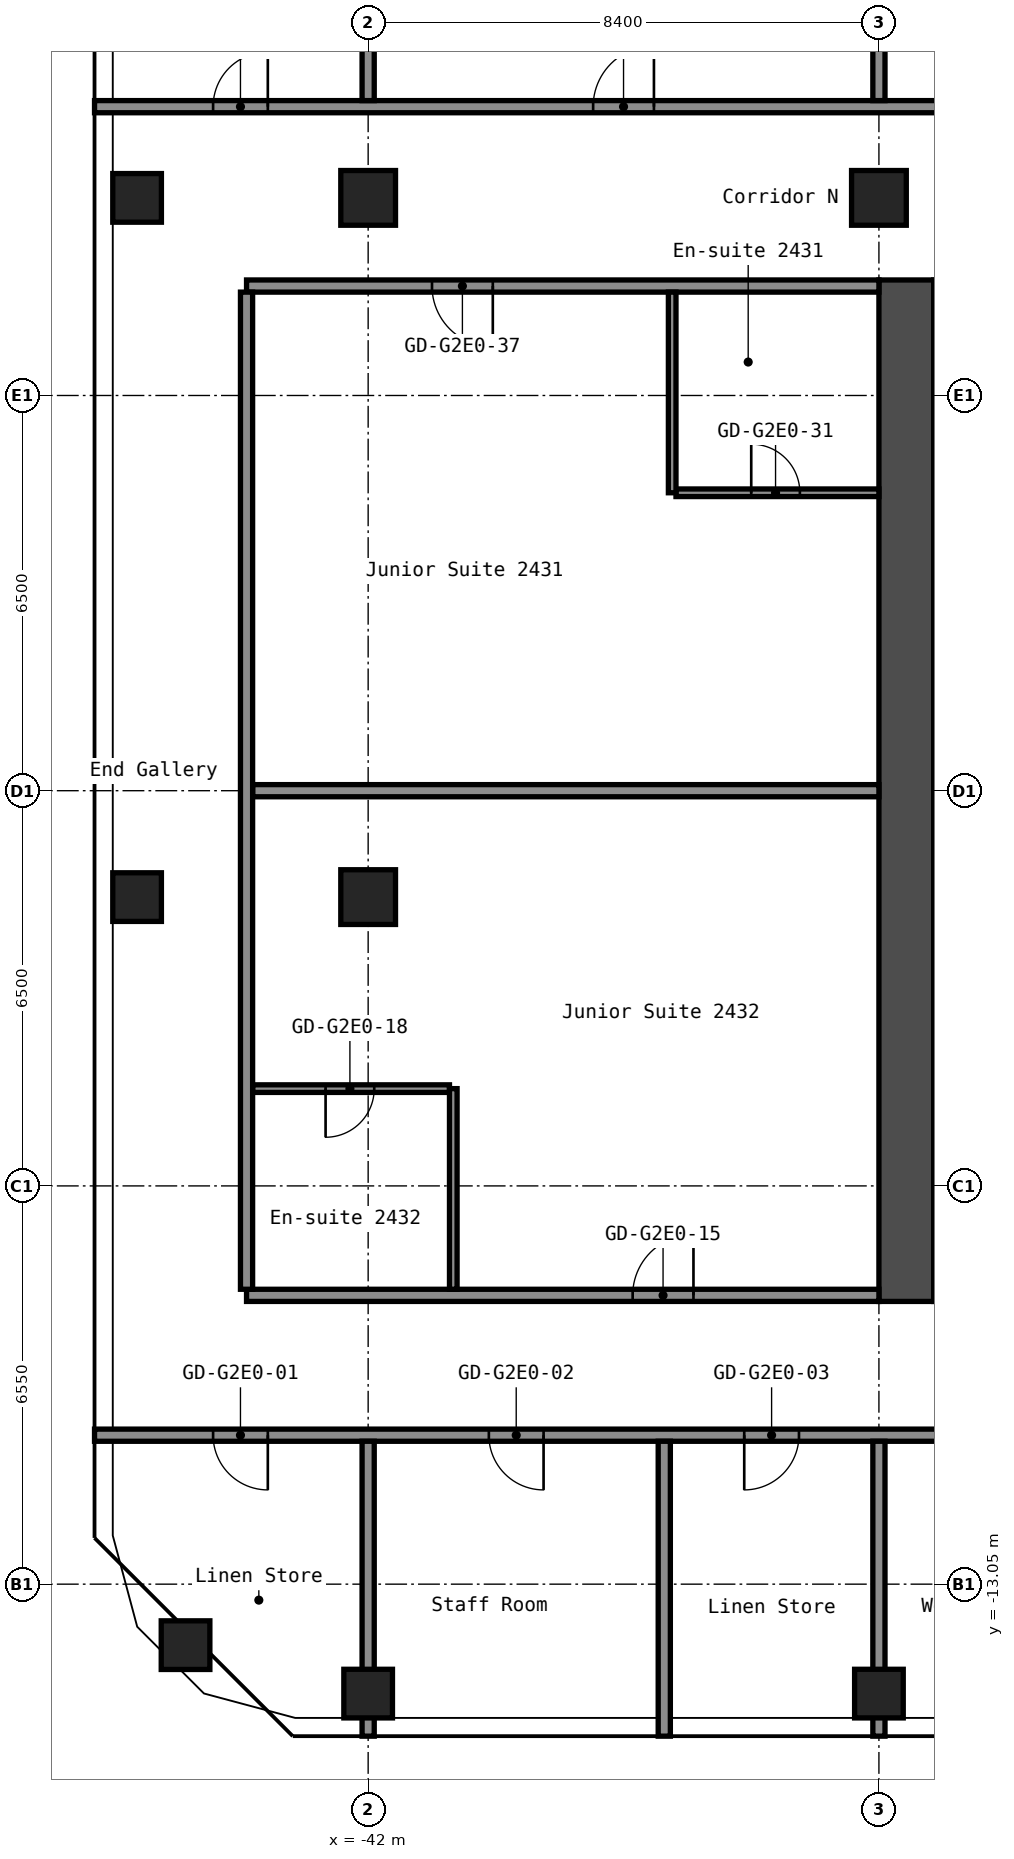
"""IFC4 building model, lengths in metres.
Left out: names, types, materials, properties, quantities, classifications, styles, units other than length and angle.
Written with IfcOpenShell. Run it as: python <this file> out.ifc"""

import sys

from ifc_helpers import new_model, si_unit, direction, frame, frame_2d, origin, origin_2d, place, context, subcontext, project, spatial, rectangle, hollow_rectangle, extrude, element, fill, save


model = new_model("IFC4")
c1 = context("Model", 3, precision=1e-05, world=origin(), true_north=direction((0.0, 1.0)))
c2 = subcontext(c1, "Body", "Model", "MODEL_VIEW")
j1 = project(units=[si_unit("LENGTHUNIT", "METRE"), si_unit("PLANEANGLEUNIT", "RADIAN")], contexts=[c1])
p1 = place(None, origin())
s1 = spatial("IfcSite", under=j1, at=p1, CompositionType="ELEMENT")
p2 = place(p1, origin())
s2 = spatial("IfcBuilding", under=s1, at=p2, CompositionType="ELEMENT")
p3 = place(p2, frame((0.0, 0.0, 88.2)))
s3 = spatial("IfcBuildingStorey", under=s2, at=p3, CompositionType="ELEMENT", Elevation=88.2)
for number, where, z_axis, x_axis in (
    (1, (-45.003, -14.053, 0.0), (0.0, 0.0, 1.0), (1.0, 0.0, 0.0)),
    (2, (-45.8, -1.75, 0.0), (0.0, 0.0, 1.0), (1.0, 0.0, 0.0)),
    (3, (-45.8, 9.75, 0.0), (0.0, 0.0, 1.0), (1.0, 0.0, 0.0)),
    (4, (-42.0, -14.85, 0.0), (0.0, 0.0, 1.0), (1.0, 0.0, 0.0)),
):
    element("IfcColumn", number, at=place(p3, frame(where, z_axis=z_axis, x_axis=x_axis)), inside=s3, PredefinedType="COLUMN", context=c2, shape_type="SweptSolid", body=[
        extrude(hollow_rectangle(XDim=0.8, YDim=0.8, WallThickness=0.032, at=origin_2d()), origin(), (0.0, 0.0, 1.0), 2.8),
    ])
for number, where, z_axis, x_axis in (
    (5, (-42.0, -1.75, 0.0), (0.0, 0.0, 1.0), (1.0, 0.0, 0.0)),
    (6, (-42.0, 9.75, 0.0), (0.0, 0.0, 1.0), (1.0, 0.0, 0.0)),
):
    element("IfcColumn", number, at=place(p3, frame(where, z_axis=z_axis, x_axis=x_axis)), inside=s3, PredefinedType="COLUMN", context=c2, shape_type="SweptSolid", body=[
        extrude(hollow_rectangle(XDim=0.9, YDim=0.9, WallThickness=0.036, at=origin_2d()), origin(), (0.0, 0.0, 1.0), 2.8),
    ])
p4 = place(p3, frame((-33.6, -14.85, 0.0), z_axis=(0.0, 0.0, 1.0), x_axis=(1.0, 0.0, 0.0)))
e7 = element("IfcColumn", 7, at=p4, inside=s3, PredefinedType="COLUMN", context=c2, shape_type="SweptSolid", body=[
    extrude(hollow_rectangle(XDim=0.8, YDim=0.8, WallThickness=0.032, at=origin_2d()), origin(), (0.0, 0.0, 1.0), 2.8),
])
p5 = place(p3, frame((-33.6, 9.75, 0.0), z_axis=(0.0, 0.0, 1.0), x_axis=(1.0, 0.0, 0.0)))
e8 = element("IfcColumn", 8, at=p5, inside=s3, PredefinedType="COLUMN", context=c2, shape_type="SweptSolid", body=[
    extrude(hollow_rectangle(XDim=0.9, YDim=0.9, WallThickness=0.036, at=origin_2d()), origin(), (0.0, 0.0, 1.0), 2.8),
])
p6 = place(p3, frame((-33.15, -8.4, 0.0), z_axis=(0.0, 0.0, 1.0), x_axis=(0.0, 1.0, 0.0)))
e9 = element("IfcWall", 9, at=p6, inside=s3, PredefinedType="SHEAR", context=c2, shape_type="SweptSolid", body=[
    extrude(rectangle(XDim=16.8, YDim=0.9, at=frame_2d((8.4, 0.0))), origin(), (0.0, 0.0, 1.0), 2.8),
])
p7 = place(p3, frame((-32.7, 1.325, 0.0), z_axis=(0.0, 0.0, 1.0), x_axis=(1.0, 0.0, 0.0)))
e10 = element("IfcWall", 10, at=p7, inside=s3, PredefinedType="SHEAR", context=c2, shape_type="SweptSolid", body=[
    extrude(rectangle(XDim=5.05, YDim=0.25, at=frame_2d((2.525, 0.0))), origin(), (0.0, 0.0, 1.0), 2.8),
])
p8 = place(p7, frame((3.3, 0.0, 0.0)))
e11 = element("IfcOpeningElement", 11, at=p8, cuts=e10, PredefinedType="OPENING", context=c2, shape_type="SweptSolid", body=[
    extrude(rectangle(XDim=1.2, YDim=2.1, at=frame_2d((0.6, 1.05))), frame((0.0, 0.135, 0.0), z_axis=(0.0, -1.0, 0.0), x_axis=(1.0, 0.0, 0.0)), (0.0, 0.0, 1.0), 0.27),
])
p9 = place(p3, frame((-32.7, -3.625, 0.0), z_axis=(0.0, 0.0, 1.0), x_axis=(1.0, 0.0, 0.0)))
e12 = element("IfcWall", 12, at=p9, inside=s3, PredefinedType="SHEAR", context=c2, shape_type="SweptSolid", body=[
    extrude(rectangle(XDim=4.55, YDim=0.25, at=frame_2d((2.275, 0.0))), origin(), (0.0, 0.0, 1.0), 2.8),
])
p10 = place(p9, frame((2.85, 0.0, 0.0)))
e13 = element("IfcOpeningElement", 13, at=p10, cuts=e12, PredefinedType="OPENING", context=c2, shape_type="SweptSolid", body=[
    extrude(rectangle(XDim=1.1, YDim=2.1, at=frame_2d((0.55, 1.05))), frame((0.0, 0.135, 0.0), z_axis=(0.0, -1.0, 0.0), x_axis=(1.0, 0.0, 0.0)), (0.0, 0.0, 1.0), 0.27),
])
p11 = place(p9, frame((0.6, 0.0, 0.0)))
e14 = element("IfcOpeningElement", 14, at=p11, cuts=e12, PredefinedType="OPENING", context=c2, shape_type="SweptSolid", body=[
    extrude(rectangle(XDim=1.1, YDim=2.1, at=frame_2d((0.55, 1.05))), frame((0.0, 0.135, 0.0), z_axis=(0.0, -1.0, 0.0), x_axis=(1.0, 0.0, 0.0)), (0.0, 0.0, 1.0), 0.27),
])
p12 = place(p3, frame((-32.7, -6.75, 0.0), z_axis=(0.0, 0.0, 1.0), x_axis=(1.0, 0.0, 0.0)))
e15 = element("IfcWall", 15, at=p12, inside=s3, PredefinedType="SHEAR", context=c2, shape_type="SweptSolid", body=[
    extrude(rectangle(XDim=4.55, YDim=1.5, at=frame_2d((2.275, 0.0))), origin(), (0.0, 0.0, 1.0), 2.8),
])
p13 = place(p3, frame((-32.7, -1.075, 0.0), z_axis=(0.0, 0.0, 1.0), x_axis=(1.0, 0.0, 0.0)))
e16 = element("IfcWall", 16, at=p13, inside=s3, PredefinedType="PARTITIONING", context=c2, shape_type="SweptSolid", body=[
    extrude(rectangle(XDim=1.6, YDim=0.15, at=frame_2d((0.8, 0.0))), origin(), (0.0, 0.0, 1.0), 2.8),
])
p14 = place(p3, frame((-46.5, -10.6, 0.0), z_axis=(0.0, 0.0, 1.0), x_axis=(1.0, 0.0, 0.0)))
e17 = element("IfcWall", 17, at=p14, inside=s3, PredefinedType="PARTITIONING", context=c2, shape_type="SweptSolid", body=[
    extrude(rectangle(XDim=29.7, YDim=0.2, at=frame_2d((14.85, 0.0))), origin(), (0.0, 0.0, 1.0), 2.8),
])
p15 = place(p14, frame((1.95, 0.0, 0.0)))
e18 = element("IfcOpeningElement", 18, at=p15, cuts=e17, PredefinedType="OPENING", context=c2, shape_type="SweptSolid", body=[
    extrude(rectangle(XDim=0.9, YDim=2.1, at=frame_2d((0.45, 1.05))), frame((0.0, 0.11, 0.0), z_axis=(0.0, -1.0, 0.0), x_axis=(1.0, 0.0, 0.0)), (0.0, 0.0, 1.0), 0.22),
])
p16 = place(p14, frame((6.485, 0.0, 0.0)))
e19 = element("IfcOpeningElement", 19, at=p16, cuts=e17, PredefinedType="OPENING", context=c2, shape_type="SweptSolid", body=[
    extrude(rectangle(XDim=0.9, YDim=2.1, at=frame_2d((0.45, 1.05))), frame((0.0, 0.11, 0.0), z_axis=(0.0, -1.0, 0.0), x_axis=(1.0, 0.0, 0.0)), (0.0, 0.0, 1.0), 0.22),
])
p17 = place(p14, frame((10.685, 0.0, 0.0)))
e20 = element("IfcOpeningElement", 20, at=p17, cuts=e17, PredefinedType="OPENING", context=c2, shape_type="SweptSolid", body=[
    extrude(rectangle(XDim=0.9, YDim=2.1, at=frame_2d((0.45, 1.05))), frame((0.0, 0.11, 0.0), z_axis=(0.0, -1.0, 0.0), x_axis=(1.0, 0.0, 0.0)), (0.0, 0.0, 1.0), 0.22),
])
p18 = place(p14, frame((14.8, 0.0, 0.0)))
e21 = element("IfcOpeningElement", 21, at=p18, cuts=e17, PredefinedType="OPENING", context=c2, shape_type="SweptSolid", body=[
    extrude(rectangle(XDim=0.9, YDim=2.1, at=frame_2d((0.45, 1.05))), frame((0.0, 0.11, 0.0), z_axis=(0.0, -1.0, 0.0), x_axis=(1.0, 0.0, 0.0)), (0.0, 0.0, 1.0), 0.22),
])
p19 = place(p14, frame((19.0, 0.0, 0.0)))
e22 = element("IfcOpeningElement", 22, at=p19, cuts=e17, PredefinedType="OPENING", context=c2, shape_type="SweptSolid", body=[
    extrude(rectangle(XDim=0.9, YDim=2.1, at=frame_2d((0.45, 1.05))), frame((0.0, 0.11, 0.0), z_axis=(0.0, -1.0, 0.0), x_axis=(1.0, 0.0, 0.0)), (0.0, 0.0, 1.0), 0.22),
])
p20 = place(p14, frame((23.455, 0.0, 0.0)))
e23 = element("IfcOpeningElement", 23, at=p20, cuts=e17, PredefinedType="OPENING", context=c2, shape_type="SweptSolid", body=[
    extrude(rectangle(XDim=0.9, YDim=2.1, at=frame_2d((0.45, 1.05))), frame((0.0, 0.11, 0.0), z_axis=(0.0, -1.0, 0.0), x_axis=(1.0, 0.0, 0.0)), (0.0, 0.0, 1.0), 0.22),
])
p21 = place(p14, frame((27.655, 0.0, 0.0)))
e24 = element("IfcOpeningElement", 24, at=p21, cuts=e17, PredefinedType="OPENING", context=c2, shape_type="SweptSolid", body=[
    extrude(rectangle(XDim=0.9, YDim=2.1, at=frame_2d((0.45, 1.05))), frame((0.0, 0.11, 0.0), z_axis=(0.0, -1.0, 0.0), x_axis=(1.0, 0.0, 0.0)), (0.0, 0.0, 1.0), 0.22),
])
p22 = place(p3, frame((-44.0, -8.3, 0.0), z_axis=(0.0, 0.0, 1.0), x_axis=(1.0, 0.0, 0.0)))
e25 = element("IfcWall", 25, at=p22, inside=s3, PredefinedType="PARTITIONING", context=c2, shape_type="SweptSolid", body=[
    extrude(rectangle(XDim=10.4, YDim=0.2, at=frame_2d((5.2, 0.0))), origin(), (0.0, 0.0, 1.0), 2.8),
])
p23 = place(p22, frame((6.35, 0.0, 0.0)))
e26 = element("IfcOpeningElement", 26, at=p23, cuts=e25, PredefinedType="OPENING", context=c2, shape_type="SweptSolid", body=[
    extrude(rectangle(XDim=1.0, YDim=2.1, at=frame_2d((0.5, 1.05))), frame((0.0, 0.11, 0.0), z_axis=(0.0, -1.0, 0.0), x_axis=(1.0, 0.0, 0.0)), (0.0, 0.0, 1.0), 0.22),
])
p24 = place(p3, frame((-43.9, -4.9, 0.0), z_axis=(0.0, 0.0, 1.0), x_axis=(1.0, 0.0, 0.0)))
e27 = element("IfcWall", 27, at=p24, inside=s3, PredefinedType="PARTITIONING", context=c2, shape_type="SweptSolid", body=[
    extrude(rectangle(XDim=3.237, YDim=0.125, at=frame_2d((1.619, 0.0))), origin(), (0.0, 0.0, 1.0), 2.8),
])
p25 = place(p24, frame((1.2, 0.0, 0.0)))
e28 = element("IfcOpeningElement", 28, at=p25, cuts=e27, PredefinedType="OPENING", context=c2, shape_type="SweptSolid", body=[
    extrude(rectangle(XDim=0.8, YDim=2.1, at=frame_2d((0.4, 1.05))), frame((0.0, 0.073, 0.0), z_axis=(0.0, -1.0, 0.0), x_axis=(1.0, 0.0, 0.0)), (0.0, 0.0, 1.0), 0.145),
])
p26 = place(p3, frame((-43.9, 0.0, 0.0), z_axis=(0.0, 0.0, 1.0), x_axis=(1.0, 0.0, 0.0)))
e29 = element("IfcWall", 29, at=p26, inside=s3, PredefinedType="PARTITIONING", context=c2, shape_type="SweptSolid", body=[
    extrude(rectangle(XDim=10.3, YDim=0.2, at=frame_2d((5.15, 0.0))), origin(), (0.0, 0.0, 1.0), 2.8),
])
p27 = place(p3, frame((-36.938, 4.9, 0.0), z_axis=(0.0, 0.0, 1.0), x_axis=(1.0, 0.0, 0.0)))
e30 = element("IfcWall", 30, at=p27, inside=s3, PredefinedType="PARTITIONING", context=c2, shape_type="SweptSolid", body=[
    extrude(rectangle(XDim=3.337, YDim=0.125, at=frame_2d((1.669, 0.0))), origin(), (0.0, 0.0, 1.0), 2.8),
])
p28 = place(p27, frame((1.238, 0.0, 0.0)))
e31 = element("IfcOpeningElement", 31, at=p28, cuts=e30, PredefinedType="OPENING", context=c2, shape_type="SweptSolid", body=[
    extrude(rectangle(XDim=0.8, YDim=2.1, at=frame_2d((0.4, 1.05))), frame((0.0, 0.073, 0.0), z_axis=(0.0, -1.0, 0.0), x_axis=(1.0, 0.0, 0.0)), (0.0, 0.0, 1.0), 0.145),
])
p29 = place(p3, frame((-44.0, 8.3, 0.0), z_axis=(0.0, 0.0, 1.0), x_axis=(1.0, 0.0, 0.0)))
e32 = element("IfcWall", 32, at=p29, inside=s3, PredefinedType="PARTITIONING", context=c2, shape_type="SweptSolid", body=[
    extrude(rectangle(XDim=10.4, YDim=0.2, at=frame_2d((5.2, 0.0))), origin(), (0.0, 0.0, 1.0), 2.8),
])
p30 = place(p29, frame((3.05, 0.0, 0.0)))
e33 = element("IfcOpeningElement", 33, at=p30, cuts=e32, PredefinedType="OPENING", context=c2, shape_type="SweptSolid", body=[
    extrude(rectangle(XDim=1.0, YDim=2.1, at=frame_2d((0.5, 1.05))), frame((0.0, 0.11, 0.0), z_axis=(0.0, -1.0, 0.0), x_axis=(1.0, 0.0, 0.0)), (0.0, 0.0, 1.0), 0.22),
])
p31 = place(p3, frame((-46.5, 11.25, 0.0), z_axis=(0.0, 0.0, 1.0), x_axis=(1.0, 0.0, 0.0)))
e34 = element("IfcWall", 34, at=p31, inside=s3, PredefinedType="PARTITIONING", context=c2, shape_type="SweptSolid", body=[
    extrude(rectangle(XDim=29.7, YDim=0.2, at=frame_2d((14.85, 0.0))), origin(), (0.0, 0.0, 1.0), 2.8),
])
p32 = place(p31, frame((1.95, 0.0, 0.0)))
e35 = element("IfcOpeningElement", 35, at=p32, cuts=e34, PredefinedType="OPENING", context=c2, shape_type="SweptSolid", body=[
    extrude(rectangle(XDim=0.9, YDim=2.1, at=frame_2d((0.45, 1.05))), frame((0.0, 0.11, 0.0), z_axis=(0.0, -1.0, 0.0), x_axis=(1.0, 0.0, 0.0)), (0.0, 0.0, 1.0), 0.22),
])
p33 = place(p31, frame((8.2, 0.0, 0.0)))
e36 = element("IfcOpeningElement", 36, at=p33, cuts=e34, PredefinedType="OPENING", context=c2, shape_type="SweptSolid", body=[
    extrude(rectangle(XDim=1.0, YDim=2.1, at=frame_2d((0.5, 1.05))), frame((0.0, 0.11, 0.0), z_axis=(0.0, -1.0, 0.0), x_axis=(1.0, 0.0, 0.0)), (0.0, 0.0, 1.0), 0.22),
])
p34 = place(p31, frame((16.6, 0.0, 0.0)))
e37 = element("IfcOpeningElement", 37, at=p34, cuts=e34, PredefinedType="OPENING", context=c2, shape_type="SweptSolid", body=[
    extrude(rectangle(XDim=1.0, YDim=2.1, at=frame_2d((0.5, 1.05))), frame((0.0, 0.11, 0.0), z_axis=(0.0, -1.0, 0.0), x_axis=(1.0, 0.0, 0.0)), (0.0, 0.0, 1.0), 0.22),
])
p35 = place(p31, frame((25.0, 0.0, 0.0)))
e38 = element("IfcOpeningElement", 38, at=p35, cuts=e34, PredefinedType="OPENING", context=c2, shape_type="SweptSolid", body=[
    extrude(rectangle(XDim=1.0, YDim=2.1, at=frame_2d((0.5, 1.05))), frame((0.0, 0.11, 0.0), z_axis=(0.0, -1.0, 0.0), x_axis=(1.0, 0.0, 0.0)), (0.0, 0.0, 1.0), 0.22),
])
p36 = place(p3, frame((-44.0, -8.2, 0.0), z_axis=(0.0, 0.0, 1.0), x_axis=(0.0, 1.0, 0.0)))
e39 = element("IfcWall", 39, at=p36, inside=s3, PredefinedType="PARTITIONING", context=c2, shape_type="SweptSolid", body=[
    extrude(rectangle(XDim=16.4, YDim=0.2, at=frame_2d((8.2, 0.0))), origin(), (0.0, 0.0, 1.0), 2.8),
])
p37 = place(p3, frame((-42.0, -15.55, 0.0), z_axis=(0.0, 0.0, 1.0), x_axis=(0.0, 1.0, 0.0)))
e40 = element("IfcWall", 40, at=p37, inside=s3, PredefinedType="PARTITIONING", context=c2, shape_type="SweptSolid", body=[
    extrude(rectangle(XDim=4.85, YDim=0.2, at=frame_2d((2.425, 0.0))), origin(), (0.0, 0.0, 1.0), 2.8),
])
p38 = place(p3, frame((-42.0, 11.35, 0.0), z_axis=(0.0, 0.0, 1.0), x_axis=(0.0, 1.0, 0.0)))
e41 = element("IfcWall", 41, at=p38, inside=s3, PredefinedType="PARTITIONING", context=c2, shape_type="SweptSolid", body=[
    extrude(rectangle(XDim=12.2, YDim=0.2, at=frame_2d((6.1, 0.0))), origin(), (0.0, 0.0, 1.0), 2.8),
])
p39 = place(p3, frame((-40.6, -8.2, 0.0), z_axis=(0.0, 0.0, 1.0), x_axis=(0.0, 1.0, 0.0)))
e42 = element("IfcWall", 42, at=p39, inside=s3, PredefinedType="PARTITIONING", context=c2, shape_type="SweptSolid", body=[
    extrude(rectangle(XDim=3.3, YDim=0.125, at=frame_2d((1.65, 0.0))), origin(), (0.0, 0.0, 1.0), 2.8),
])
p40 = place(p3, frame((-37.13, -15.55, 0.0), z_axis=(0.0, 0.0, 1.0), x_axis=(0.0, 1.0, 0.0)))
e43 = element("IfcWall", 43, at=p40, inside=s3, PredefinedType="PARTITIONING", context=c2, shape_type="SweptSolid", body=[
    extrude(rectangle(XDim=4.85, YDim=0.2, at=frame_2d((2.425, 0.0))), origin(), (0.0, 0.0, 1.0), 2.8),
])
p41 = place(p3, frame((-37.0, 4.9, 0.0), z_axis=(0.0, 0.0, 1.0), x_axis=(0.0, 1.0, 0.0)))
e44 = element("IfcWall", 44, at=p41, inside=s3, PredefinedType="PARTITIONING", context=c2, shape_type="SweptSolid", body=[
    extrude(rectangle(XDim=3.3, YDim=0.125, at=frame_2d((1.65, 0.0))), origin(), (0.0, 0.0, 1.0), 2.8),
])
p42 = place(p3, frame((-33.6, -15.55, 0.0), z_axis=(0.0, 0.0, 1.0), x_axis=(0.0, 1.0, 0.0)))
e45 = element("IfcWall", 45, at=p42, inside=s3, PredefinedType="PARTITIONING", context=c2, shape_type="SweptSolid", body=[
    extrude(rectangle(XDim=4.85, YDim=0.2, at=frame_2d((2.425, 0.0))), origin(), (0.0, 0.0, 1.0), 2.8),
])
p43 = place(p3, frame((-33.6, 11.35, 0.0), z_axis=(0.0, 0.0, 1.0), x_axis=(0.0, 1.0, 0.0)))
e46 = element("IfcWall", 46, at=p43, inside=s3, PredefinedType="PARTITIONING", context=c2, shape_type="SweptSolid", body=[
    extrude(rectangle(XDim=12.2, YDim=0.2, at=frame_2d((6.1, 0.0))), origin(), (0.0, 0.0, 1.0), 2.8),
])
p44 = place(p15, origin())
e47 = element("IfcDoor", 47, at=p44, inside=s3, OperationType="SINGLE_SWING_RIGHT", PredefinedType="DOOR", context=c2, shape_type="SweptSolid", body=[
    extrude(rectangle(XDim=0.9, YDim=2.1, at=frame_2d((0.45, 1.05))), frame((0.0, 0.025, 0.0), z_axis=(0.0, -1.0, 0.0), x_axis=(1.0, 0.0, 0.0)), (0.0, 0.0, 1.0), 0.05),
])
fill(e18, e47)
p45 = place(p16, origin())
e48 = element("IfcDoor", 48, at=p45, inside=s3, OperationType="SINGLE_SWING_RIGHT", PredefinedType="DOOR", context=c2, shape_type="SweptSolid", body=[
    extrude(rectangle(XDim=0.9, YDim=2.1, at=frame_2d((0.45, 1.05))), frame((0.0, 0.025, 0.0), z_axis=(0.0, -1.0, 0.0), x_axis=(1.0, 0.0, 0.0)), (0.0, 0.0, 1.0), 0.05),
])
fill(e19, e48)
p46 = place(p17, origin())
e49 = element("IfcDoor", 49, at=p46, inside=s3, OperationType="SINGLE_SWING_LEFT", PredefinedType="DOOR", context=c2, shape_type="SweptSolid", body=[
    extrude(rectangle(XDim=0.9, YDim=2.1, at=frame_2d((0.45, 1.05))), frame((0.0, 0.025, 0.0), z_axis=(0.0, -1.0, 0.0), x_axis=(1.0, 0.0, 0.0)), (0.0, 0.0, 1.0), 0.05),
])
fill(e20, e49)
p47 = place(p23, origin())
e50 = element("IfcDoor", 50, at=p47, inside=s3, OperationType="SINGLE_SWING_LEFT", PredefinedType="DOOR", context=c2, shape_type="SweptSolid", body=[
    extrude(rectangle(XDim=1.0, YDim=2.1, at=frame_2d((0.5, 1.05))), frame((0.0, 0.025, 0.0), z_axis=(0.0, -1.0, 0.0), x_axis=(1.0, 0.0, 0.0)), (0.0, 0.0, 1.0), 0.05),
])
fill(e26, e50)
p48 = place(p25, origin())
e51 = element("IfcDoor", 51, at=p48, inside=s3, OperationType="SINGLE_SWING_LEFT", PredefinedType="DOOR", context=c2, shape_type="SweptSolid", body=[
    extrude(rectangle(XDim=0.8, YDim=2.1, at=frame_2d((0.4, 1.05))), frame((0.0, 0.025, 0.0), z_axis=(0.0, -1.0, 0.0), x_axis=(1.0, 0.0, 0.0)), (0.0, 0.0, 1.0), 0.05),
])
fill(e28, e51)
p49 = place(p28, origin())
e52 = element("IfcDoor", 52, at=p49, inside=s3, OperationType="SINGLE_SWING_RIGHT", PredefinedType="DOOR", context=c2, shape_type="SweptSolid", body=[
    extrude(rectangle(XDim=0.8, YDim=2.1, at=frame_2d((0.4, 1.05))), frame((0.0, 0.025, 0.0), z_axis=(0.0, -1.0, 0.0), x_axis=(1.0, 0.0, 0.0)), (0.0, 0.0, 1.0), 0.05),
])
fill(e31, e52)
p50 = place(p30, origin())
e53 = element("IfcDoor", 53, at=p50, inside=s3, OperationType="SINGLE_SWING_RIGHT", PredefinedType="DOOR", context=c2, shape_type="SweptSolid", body=[
    extrude(rectangle(XDim=1.0, YDim=2.1, at=frame_2d((0.5, 1.05))), frame((0.0, 0.025, 0.0), z_axis=(0.0, -1.0, 0.0), x_axis=(1.0, 0.0, 0.0)), (0.0, 0.0, 1.0), 0.05),
])
fill(e33, e53)
p51 = place(p32, origin())
e54 = element("IfcDoor", 54, at=p51, inside=s3, OperationType="SINGLE_SWING_LEFT", PredefinedType="DOOR", context=c2, shape_type="SweptSolid", body=[
    extrude(rectangle(XDim=0.9, YDim=2.1, at=frame_2d((0.45, 1.05))), frame((0.0, 0.025, 0.0), z_axis=(0.0, -1.0, 0.0), x_axis=(1.0, 0.0, 0.0)), (0.0, 0.0, 1.0), 0.05),
])
fill(e35, e54)
p52 = place(p33, origin())
e55 = element("IfcDoor", 55, at=p52, inside=s3, OperationType="SINGLE_SWING_LEFT", PredefinedType="DOOR", context=c2, shape_type="SweptSolid", body=[
    extrude(rectangle(XDim=1.0, YDim=2.1, at=frame_2d((0.5, 1.05))), frame((0.0, 0.025, 0.0), z_axis=(0.0, -1.0, 0.0), x_axis=(1.0, 0.0, 0.0)), (0.0, 0.0, 1.0), 0.05),
])
fill(e36, e55)
save(model, sys.argv[1])
